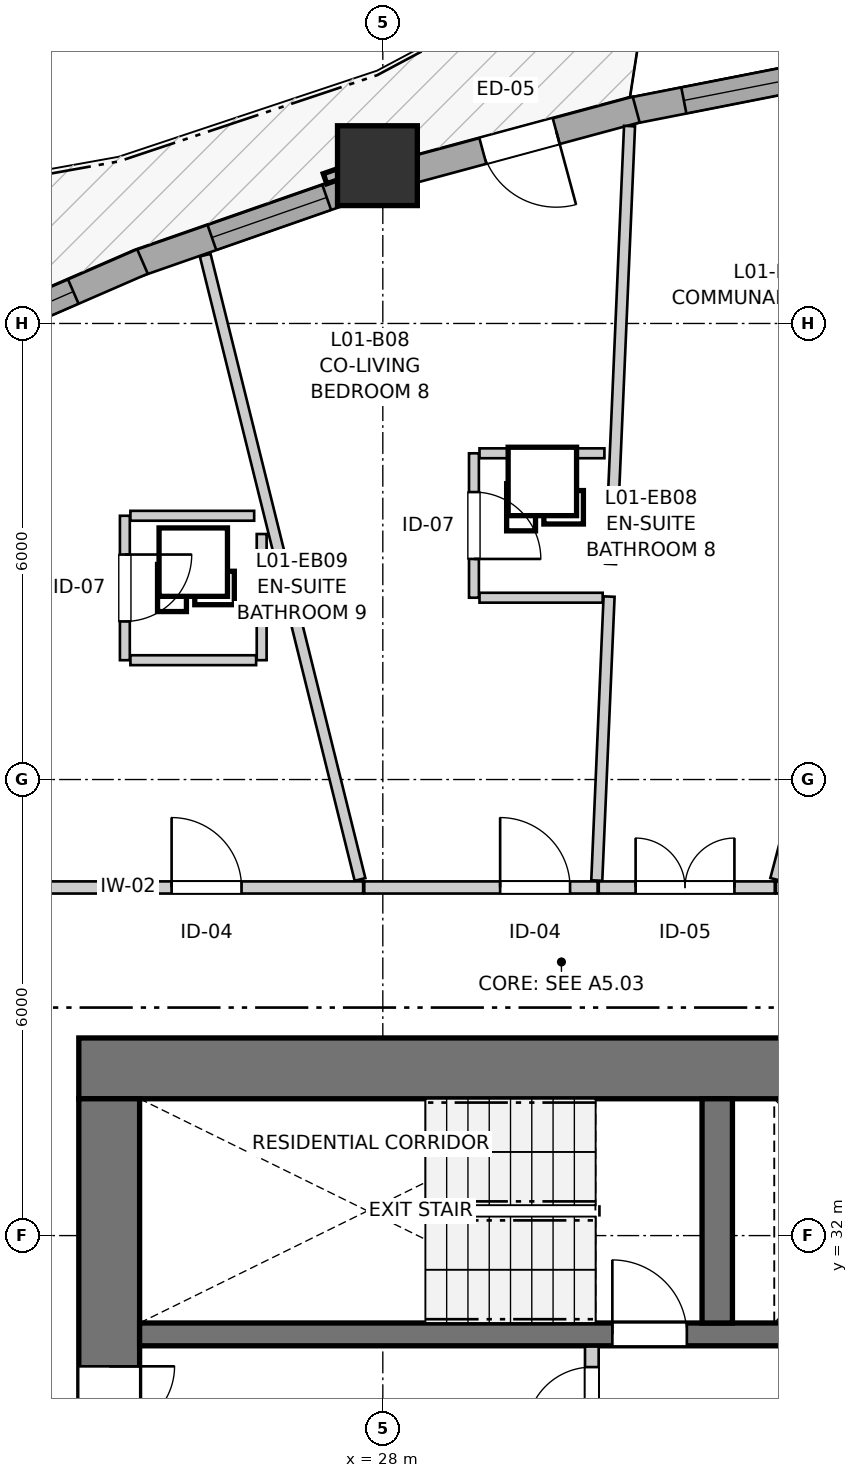
"""IFC4 building model, lengths in metres.
Left out: names, types, materials, properties, quantities, classifications, styles, units other than length and angle.
Written with IfcOpenShell. Run it as: python <this file> out.ifc"""

import sys

from ifc_helpers import new_model, si_unit, direction, frame, frame_2d, origin, origin_2d, place, context, subcontext, project, spatial, rectangle, extrude, source, transform, mapped, element, fill, save


model = new_model("IFC4")
c1 = context("Model", 3, precision=1e-05, world=origin(), true_north=direction((0.0, 1.0)))
c2 = subcontext(c1, "Body", "Model", "MODEL_VIEW")
j1 = project(units=[si_unit("LENGTHUNIT", "METRE"), si_unit("PLANEANGLEUNIT", "RADIAN")], contexts=[c1])
p1 = place(None, origin())
s1 = spatial("IfcSite", under=j1, at=p1, CompositionType="ELEMENT")
p2 = place(p1, origin())
s2 = spatial("IfcBuilding", under=s1, at=p2, CompositionType="ELEMENT")
p3 = place(p2, frame((0.0, 0.0, 7.8)))
s3 = spatial("IfcBuildingStorey", under=s2, at=p3, CompositionType="ELEMENT", Elevation=7.8)
p4 = place(p3, frame((36.7, 34.2, 0.0), z_axis=(0.0, 0.0, 1.0), x_axis=(-1.0, 0.0, 0.0)))
e1 = element("IfcWall", 1, at=p4, inside=s3, PredefinedType="SHEAR", context=c2, shape_type="SweptSolid", body=[
    extrude(rectangle(XDim=12.7, YDim=0.8, at=frame_2d((6.35, 0.0))), origin(), (0.0, 0.0, 1.0), 2.94),
])
p5 = place(p3, frame((24.4, 33.8, 0.0), z_axis=(0.0, 0.0, 1.0), x_axis=(0.0, -1.0, 0.0)))
e2 = element("IfcWall", 2, at=p5, inside=s3, PredefinedType="SHEAR", context=c2, shape_type="SweptSolid", body=[
    extrude(rectangle(XDim=15.6, YDim=0.8, at=frame_2d((7.8, 0.0))), origin(), (0.0, 0.0, 1.0), 2.94),
])
p6 = place(p5, frame((7.05, 0.0, 0.0)))
e3 = element("IfcOpeningElement", 3, at=p6, cuts=e2, PredefinedType="OPENING", context=c2, shape_type="SweptSolid", body=[
    extrude(rectangle(XDim=1.5, YDim=2.15, at=frame_2d((0.75, 1.075))), frame((0.0, 0.41, 0.0), z_axis=(0.0, -1.0, 0.0), x_axis=(1.0, 0.0, 0.0)), (0.0, 0.0, 1.0), 0.82),
])
p7 = place(p5, frame((3.52, 0.0, 0.0)))
e4 = element("IfcOpeningElement", 4, at=p7, cuts=e2, PredefinedType="OPENING", context=c2, shape_type="SweptSolid", body=[
    extrude(rectangle(XDim=0.86, YDim=2.05, at=frame_2d((0.43, 1.025))), frame((0.0, 0.41, 0.0), z_axis=(0.0, -1.0, 0.0), x_axis=(1.0, 0.0, 0.0)), (0.0, 0.0, 1.0), 0.82),
])
p8 = place(p5, frame((11.22, 0.0, 0.0)))
e5 = element("IfcOpeningElement", 5, at=p8, cuts=e2, PredefinedType="OPENING", context=c2, shape_type="SweptSolid", body=[
    extrude(rectangle(XDim=0.86, YDim=2.05, at=frame_2d((0.43, 1.025))), frame((0.0, 0.41, 0.0), z_axis=(0.0, -1.0, 0.0), x_axis=(1.0, 0.0, 0.0)), (0.0, 0.0, 1.0), 0.82),
])
p9 = place(p3, frame((24.8, 30.7, 0.0), z_axis=(0.0, 0.0, 1.0), x_axis=(1.0, 0.0, 0.0)))
e6 = element("IfcWall", 6, at=p9, inside=s3, PredefinedType="SHEAR", context=c2, shape_type="SweptSolid", body=[
    extrude(rectangle(XDim=11.1, YDim=0.3, at=frame_2d((5.55, 0.0))), origin(), (0.0, 0.0, 1.0), 2.94),
])
p10 = place(p9, frame((6.22, 0.0, 0.0)))
e7 = element("IfcOpeningElement", 7, at=p10, cuts=e6, PredefinedType="OPENING", context=c2, shape_type="SweptSolid", body=[
    extrude(rectangle(XDim=0.98, YDim=2.15, at=frame_2d((0.49, 1.075))), frame((0.0, 0.16, 0.0), z_axis=(0.0, -1.0, 0.0), x_axis=(1.0, 0.0, 0.0)), (0.0, 0.0, 1.0), 0.32),
])
p11 = place(p9, frame((9.15, 0.0, 0.0)))
e8 = element("IfcOpeningElement", 8, at=p11, cuts=e6, PredefinedType="OPENING", context=c2, shape_type="SweptSolid", body=[
    extrude(rectangle(XDim=1.15, YDim=2.15, at=frame_2d((0.575, 1.075))), frame((0.0, 0.16, 0.0), z_axis=(0.0, -1.0, 0.0), x_axis=(1.0, 0.0, 0.0)), (0.0, 0.0, 1.0), 0.32),
])
p12 = place(p3, frame((32.4, 30.85, 0.0), z_axis=(0.0, 0.0, 1.0), x_axis=(0.0, 1.0, 0.0)))
e9 = element("IfcWall", 9, at=p12, inside=s3, PredefinedType="SHEAR", context=c2, shape_type="SweptSolid", body=[
    extrude(rectangle(XDim=2.95, YDim=0.4, at=frame_2d((1.475, 0.0))), origin(), (0.0, 0.0, 1.0), 2.94),
])
m1 = source(origin(), c2, "Body", "SweptSolid", [
    extrude(rectangle(XDim=1.05, YDim=1.05, at=origin_2d()), origin(), (0.0, 0.0, 1.0), 2.94),
])
p13 = place(p3, frame((27.929, 46.076, 0.0), z_axis=(0.0, 0.0, 1.0), x_axis=(1.0, 0.0, 0.0)))
e10 = element("IfcColumn", 10, at=p13, inside=s3, PredefinedType="COLUMN", context=c2, shape_type="MappedRepresentation", body=[
    mapped(m1, transform((0.0, 0.0, 0.0), x_axis=(1.0, 0.0, 0.0), y_axis=(0.0, 1.0, 0.0), z_axis=(0.0, 0.0, 1.0), scale=1.0)),
])
p14 = place(p3, frame((34.714, 47.475, 0.0), z_axis=(0.0, 0.0, 1.0), x_axis=(-0.981221268425, -0.192885516282, 0.0)))
e11 = element("IfcWall", 11, at=p14, inside=s3, PredefinedType="SOLIDWALL", context=c2, shape_type="SweptSolid", body=[
    extrude(rectangle(XDim=3.533, YDim=0.35, at=frame_2d((1.766, 0.0))), origin(), (0.0, 0.0, 1.0), 2.42),
])
p15 = place(p14, frame((0.706, 0.0, 0.82)))
e12 = element("IfcOpeningElement", 12, at=p15, cuts=e11, PredefinedType="OPENING", context=c2, shape_type="SweptSolid", body=[
    extrude(rectangle(XDim=2.1, YDim=1.4, at=frame_2d((1.05, 0.7))), frame((0.0, 0.185, 0.0), z_axis=(0.0, -1.0, 0.0), x_axis=(1.0, 0.0, 0.0)), (0.0, 0.0, 1.0), 0.37),
])
p16 = place(p3, frame((31.333, 46.814, 0.0), z_axis=(0.0, 0.0, 1.0), x_axis=(-0.965456905924, -0.260562780926, 0.0)))
e13 = element("IfcWall", 13, at=p16, inside=s3, PredefinedType="SOLIDWALL", context=c2, shape_type="SweptSolid", body=[
    extrude(rectangle(XDim=3.179, YDim=0.35, at=frame_2d((1.59, 0.0))), origin(), (0.0, 0.0, 1.0), 2.42),
])
p17 = place(p16, frame((1.09, 0.0, 0.0)))
e14 = element("IfcOpeningElement", 14, at=p17, cuts=e13, PredefinedType="OPENING", context=c2, shape_type="SweptSolid", body=[
    extrude(rectangle(XDim=1.0, YDim=2.1, at=frame_2d((0.5, 1.05))), frame((0.0, 0.185, 0.0), z_axis=(0.0, -1.0, 0.0), x_axis=(1.0, 0.0, 0.0)), (0.0, 0.0, 1.0), 0.37),
])
p18 = place(p3, frame((27.703, 45.812, 0.0), z_axis=(0.0, 0.0, 1.0), x_axis=(-0.944149283204, -0.329518028377, 0.0)))
e15 = element("IfcWall", 15, at=p18, inside=s3, PredefinedType="SOLIDWALL", context=c2, shape_type="SweptSolid", body=[
    extrude(rectangle(XDim=3.123, YDim=0.35, at=frame_2d((1.562, 0.0))), origin(), (0.0, 0.0, 1.0), 2.42),
])
p19 = place(p18, frame((0.468, 0.0, 0.82)))
e16 = element("IfcOpeningElement", 16, at=p19, cuts=e15, PredefinedType="OPENING", context=c2, shape_type="SweptSolid", body=[
    extrude(rectangle(XDim=1.6, YDim=1.35, at=frame_2d((0.8, 0.675))), frame((0.0, 0.185, 0.0), z_axis=(0.0, -1.0, 0.0), x_axis=(1.0, 0.0, 0.0)), (0.0, 0.0, 1.0), 0.37),
])
p20 = place(p3, frame((24.838, 44.815, 0.0), z_axis=(0.0, 0.0, 1.0), x_axis=(-0.917087357706, -0.398686315712, 0.0)))
e17 = element("IfcWall", 17, at=p20, inside=s3, PredefinedType="SOLIDWALL", context=c2, shape_type="SweptSolid", body=[
    extrude(rectangle(XDim=3.365, YDim=0.35, at=frame_2d((1.683, 0.0))), origin(), (0.0, 0.0, 1.0), 2.42),
])
p21 = place(p20, frame((0.992, 0.0, 0.82)))
e18 = element("IfcOpeningElement", 18, at=p21, cuts=e17, PredefinedType="OPENING", context=c2, shape_type="SweptSolid", body=[
    extrude(rectangle(XDim=1.4, YDim=1.35, at=frame_2d((0.7, 0.675))), frame((0.0, 0.185, 0.0), z_axis=(0.0, -1.0, 0.0), x_axis=(1.0, 0.0, 0.0)), (0.0, 0.0, 1.0), 0.37),
])
p22 = place(p3, frame((30.75, 27.43, 0.0), z_axis=(0.0, 0.0, 1.0), x_axis=(0.0, 1.0, 0.0)))
e19 = element("IfcWall", 19, at=p22, inside=s3, PredefinedType="PARTITIONING", context=c2, shape_type="SweptSolid", body=[
    extrude(rectangle(XDim=3.11, YDim=0.18, at=frame_2d((1.555, 0.0))), origin(), (0.0, 0.0, 1.0), 2.94),
])
p23 = place(p22, frame((1.98, 0.0, 0.0)))
e20 = element("IfcOpeningElement", 20, at=p23, cuts=e19, PredefinedType="OPENING", context=c2, shape_type="SweptSolid", body=[
    extrude(rectangle(XDim=0.86, YDim=2.05, at=frame_2d((0.43, 1.025))), frame((0.0, 0.1, 0.0), z_axis=(0.0, -1.0, 0.0), x_axis=(1.0, 0.0, 0.0)), (0.0, 0.0, 1.0), 0.2),
])
p24 = place(p3, frame((23.618, 36.58, 0.0), z_axis=(0.0, 0.0, 1.0), x_axis=(1.0, 0.0, 0.0)))
e21 = element("IfcWall", 21, at=p24, inside=s3, PredefinedType="PARTITIONING", context=c2, shape_type="SweptSolid", body=[
    extrude(rectangle(XDim=4.123, YDim=0.16, at=frame_2d((2.062, 0.0))), origin(), (0.0, 0.0, 1.0), 2.548),
])
p25 = place(p24, frame((1.603, 0.0, 0.0)))
e22 = element("IfcOpeningElement", 22, at=p25, cuts=e21, PredefinedType="OPENING", context=c2, shape_type="SweptSolid", body=[
    extrude(rectangle(XDim=0.92, YDim=2.1, at=frame_2d((0.46, 1.05))), frame((0.0, 0.09, 0.0), z_axis=(0.0, -1.0, 0.0), x_axis=(1.0, 0.0, 0.0)), (0.0, 0.0, 1.0), 0.18),
])
p26 = place(p3, frame((27.756, 36.58, 0.0), z_axis=(0.0, 0.0, 1.0), x_axis=(1.0, 0.0, 0.0)))
e23 = element("IfcWall", 23, at=p26, inside=s3, PredefinedType="PARTITIONING", context=c2, shape_type="SweptSolid", body=[
    extrude(rectangle(XDim=3.07, YDim=0.16, at=frame_2d((1.535, 0.0))), origin(), (0.0, 0.0, 1.0), 2.94),
])
p27 = place(p26, frame((1.788, 0.0, 0.0)))
e24 = element("IfcOpeningElement", 24, at=p27, cuts=e23, PredefinedType="OPENING", context=c2, shape_type="SweptSolid", body=[
    extrude(rectangle(XDim=0.92, YDim=2.1, at=frame_2d((0.46, 1.05))), frame((0.0, 0.09, 0.0), z_axis=(0.0, -1.0, 0.0), x_axis=(1.0, 0.0, 0.0)), (0.0, 0.0, 1.0), 0.18),
])
p28 = place(p3, frame((30.841, 36.58, 0.0), z_axis=(0.0, 0.0, 1.0), x_axis=(1.0, 0.0, 0.0)))
e25 = element("IfcWall", 25, at=p28, inside=s3, PredefinedType="PARTITIONING", context=c2, shape_type="SweptSolid", body=[
    extrude(rectangle(XDim=2.316, YDim=0.16, at=frame_2d((1.158, 0.0))), origin(), (0.0, 0.0, 1.0), 2.94),
])
p29 = place(p28, frame((0.485, 0.0, 0.0)))
e26 = element("IfcOpeningElement", 26, at=p29, cuts=e25, PredefinedType="OPENING", context=c2, shape_type="SweptSolid", body=[
    extrude(rectangle(XDim=1.3, YDim=2.1, at=frame_2d((0.65, 1.05))), frame((0.0, 0.09, 0.0), z_axis=(0.0, -1.0, 0.0), x_axis=(1.0, 0.0, 0.0)), (0.0, 0.0, 1.0), 0.18),
])
p30 = place(p3, frame((33.172, 36.58, 0.0), z_axis=(0.0, 0.0, 1.0), x_axis=(1.0, 0.0, 0.0)))
e27 = element("IfcWall", 27, at=p30, inside=s3, PredefinedType="PARTITIONING", context=c2, shape_type="SweptSolid", body=[
    extrude(rectangle(XDim=2.173, YDim=0.16, at=frame_2d((1.086, 0.0))), origin(), (0.0, 0.0, 1.0), 2.94),
])
p31 = place(p30, frame((0.603, 0.0, 0.0)))
e28 = element("IfcOpeningElement", 28, at=p31, cuts=e27, PredefinedType="OPENING", context=c2, shape_type="SweptSolid", body=[
    extrude(rectangle(XDim=0.92, YDim=2.1, at=frame_2d((0.46, 1.05))), frame((0.0, 0.09, 0.0), z_axis=(0.0, -1.0, 0.0), x_axis=(1.0, 0.0, 0.0)), (0.0, 0.0, 1.0), 0.18),
])
p32 = place(p3, frame((29.199, 42.292, 0.0), z_axis=(0.0, 0.0, 1.0), x_axis=(0.0, -1.0, 0.0)))
e29 = element("IfcWall", 29, at=p32, inside=s3, PredefinedType="PARTITIONING", context=c2, shape_type="SweptSolid", body=[
    extrude(rectangle(XDim=1.9, YDim=0.13, at=frame_2d((0.95, 0.0))), origin(), (0.0, 0.0, 1.0), 2.94),
])
p33 = place(p32, frame((0.51, 0.0, 0.0)))
e30 = element("IfcOpeningElement", 30, at=p33, cuts=e29, PredefinedType="OPENING", context=c2, shape_type="SweptSolid", body=[
    extrude(rectangle(XDim=0.88, YDim=2.05, at=frame_2d((0.44, 1.025))), frame((0.0, 0.075, 0.0), z_axis=(0.0, -1.0, 0.0), x_axis=(1.0, 0.0, 0.0)), (0.0, 0.0, 1.0), 0.15),
])
p34 = place(p3, frame((24.606, 41.47, 0.0), z_axis=(0.0, 0.0, 1.0), x_axis=(0.0, -1.0, 0.0)))
e31 = element("IfcWall", 31, at=p34, inside=s3, PredefinedType="PARTITIONING", context=c2, shape_type="SweptSolid", body=[
    extrude(rectangle(XDim=1.9, YDim=0.13, at=frame_2d((0.95, 0.0))), origin(), (0.0, 0.0, 1.0), 2.94),
])
p35 = place(p34, frame((0.51, 0.0, 0.0)))
e32 = element("IfcOpeningElement", 32, at=p35, cuts=e31, PredefinedType="OPENING", context=c2, shape_type="SweptSolid", body=[
    extrude(rectangle(XDim=0.88, YDim=2.05, at=frame_2d((0.44, 1.025))), frame((0.0, 0.075, 0.0), z_axis=(0.0, -1.0, 0.0), x_axis=(1.0, 0.0, 0.0)), (0.0, 0.0, 1.0), 0.15),
])
p36 = place(p3, frame((33.169, 36.686, 0.0), z_axis=(0.0, 0.0, 1.0), x_axis=(0.255112522394, 0.966911371801, 0.0)))
e33 = element("IfcWall", 33, at=p36, inside=s3, PredefinedType="PARTITIONING", context=c2, shape_type="SweptSolid", body=[
    extrude(rectangle(XDim=11.469, YDim=0.145, at=frame_2d((5.734, 0.0))), origin(), (0.0, 0.0, 1.0), 2.94),
])
p37 = place(p3, frame((25.663, 44.899, 0.0), z_axis=(0.0, 0.0, 1.0), x_axis=(0.240695577024, -0.970600658974, 0.0)))
e34 = element("IfcWall", 34, at=p37, inside=s3, PredefinedType="PARTITIONING", context=c2, shape_type="SweptSolid", body=[
    extrude(rectangle(XDim=8.462, YDim=0.145, at=frame_2d((4.231, 0.0))), origin(), (0.0, 0.0, 1.0), 2.94),
])
p38 = place(p3, frame((30.996, 40.836, 0.0), z_axis=(0.0, 0.0, 1.0), x_axis=(0.043354544378, 0.999059749706, 0.0)))
e35 = element("IfcWall", 35, at=p38, inside=s3, PredefinedType="PARTITIONING", context=c2, shape_type="SweptSolid", body=[
    extrude(rectangle(XDim=5.766, YDim=0.145, at=frame_2d((2.883, 0.0))), origin(), (0.0, 0.0, 1.0), 2.94),
])
p39 = place(p3, frame((30.815, 36.671, 0.0), z_axis=(0.0, 0.0, 1.0), x_axis=(0.043352224588, 0.999059850371, 0.0)))
e36 = element("IfcWall", 36, at=p39, inside=s3, PredefinedType="PARTITIONING", context=c2, shape_type="SweptSolid", body=[
    extrude(rectangle(XDim=3.739, YDim=0.145, at=frame_2d((1.87, 0.0))), origin(), (0.0, 0.0, 1.0), 2.94),
])
p40 = place(p3, frame((26.406, 39.57, 0.0), z_axis=(0.0, 0.0, 1.0), x_axis=(0.0, 1.0, 0.0)))
e37 = element("IfcWall", 37, at=p40, inside=s3, PredefinedType="PARTITIONING", context=c2, shape_type="SweptSolid", body=[
    extrude(rectangle(XDim=1.66, YDim=0.13, at=frame_2d((0.83, 0.0))), origin(), (0.0, 0.0, 1.0), 2.94),
])
p41 = place(p3, frame((29.272, 42.292, 0.0), z_axis=(0.0, 0.0, 1.0), x_axis=(1.0, 0.0, 0.0)))
e38 = element("IfcWall", 38, at=p41, inside=s3, PredefinedType="PARTITIONING", context=c2, shape_type="SweptSolid", body=[
    extrude(rectangle(XDim=1.644, YDim=0.13, at=frame_2d((0.822, 0.0))), origin(), (0.0, 0.0, 1.0), 2.508),
])
p42 = place(p3, frame((24.679, 41.47, 0.0), z_axis=(0.0, 0.0, 1.0), x_axis=(1.0, 0.0, 0.0)))
e39 = element("IfcWall", 39, at=p42, inside=s3, PredefinedType="PARTITIONING", context=c2, shape_type="SweptSolid", body=[
    extrude(rectangle(XDim=1.628, YDim=0.13, at=frame_2d((0.814, 0.0))), origin(), (0.0, 0.0, 1.0), 2.508),
])
p43 = place(p3, frame((24.679, 39.57, 0.0), z_axis=(0.0, 0.0, 1.0), x_axis=(1.0, 0.0, 0.0)))
e40 = element("IfcWall", 40, at=p43, inside=s3, PredefinedType="PARTITIONING", context=c2, shape_type="SweptSolid", body=[
    extrude(rectangle(XDim=1.654, YDim=0.13, at=frame_2d((0.827, 0.0))), origin(), (0.0, 0.0, 1.0), 2.94),
])
p44 = place(p3, frame((29.272, 40.392, 0.0), z_axis=(0.0, 0.0, 1.0), x_axis=(1.0, 0.0, 0.0)))
e41 = element("IfcWall", 41, at=p44, inside=s3, PredefinedType="PARTITIONING", context=c2, shape_type="SweptSolid", body=[
    extrude(rectangle(XDim=1.621, YDim=0.13, at=frame_2d((0.81, 0.0))), origin(), (0.0, 0.0, 1.0), 2.94),
])
m2 = source(origin(), c2, "Body", "SweptSolid", [
    extrude(rectangle(XDim=2.1, YDim=1.4, at=frame_2d((1.05, 0.7))), frame((0.0, 0.03, 0.0), z_axis=(0.0, -1.0, 0.0), x_axis=(1.0, 0.0, 0.0)), (0.0, 0.0, 1.0), 0.06),
])
p45 = place(p15, origin())
e42 = element("IfcWindow", 42, at=p45, inside=s3, PartitioningType="SINGLE_PANEL", PredefinedType="WINDOW", context=c2, shape_type="MappedRepresentation", body=[
    mapped(m2, transform((0.0, 0.0, 0.0), x_axis=(1.0, 0.0, 0.0), y_axis=(0.0, 1.0, 0.0), z_axis=(0.0, 0.0, 1.0), scale=1.0)),
])
fill(e12, e42)
m3 = source(origin(), c2, "Body", "SweptSolid", [
    extrude(rectangle(XDim=1.6, YDim=1.35, at=frame_2d((0.8, 0.675))), frame((0.0, 0.03, 0.0), z_axis=(0.0, -1.0, 0.0), x_axis=(1.0, 0.0, 0.0)), (0.0, 0.0, 1.0), 0.06),
])
p46 = place(p19, origin())
e43 = element("IfcWindow", 43, at=p46, inside=s3, PartitioningType="SINGLE_PANEL", PredefinedType="WINDOW", context=c2, shape_type="MappedRepresentation", body=[
    mapped(m3, transform((0.0, 0.0, 0.0), x_axis=(1.0, 0.0, 0.0), y_axis=(0.0, 1.0, 0.0), z_axis=(0.0, 0.0, 1.0), scale=1.0)),
])
fill(e16, e43)
m4 = source(origin(), c2, "Body", "SweptSolid", [
    extrude(rectangle(XDim=1.4, YDim=1.35, at=frame_2d((0.7, 0.675))), frame((0.0, 0.03, 0.0), z_axis=(0.0, -1.0, 0.0), x_axis=(1.0, 0.0, 0.0)), (0.0, 0.0, 1.0), 0.06),
])
p47 = place(p21, origin())
e44 = element("IfcWindow", 44, at=p47, inside=s3, PartitioningType="SINGLE_PANEL", PredefinedType="WINDOW", context=c2, shape_type="MappedRepresentation", body=[
    mapped(m4, transform((0.0, 0.0, 0.0), x_axis=(1.0, 0.0, 0.0), y_axis=(0.0, 1.0, 0.0), z_axis=(0.0, 0.0, 1.0), scale=1.0)),
])
fill(e18, e44)
m5 = source(origin(), c2, "Body", "SweptSolid", [
    extrude(rectangle(XDim=1.0, YDim=2.1, at=frame_2d((0.5, 1.05))), frame((0.0, 0.025, 0.0), z_axis=(0.0, -1.0, 0.0), x_axis=(1.0, 0.0, 0.0)), (0.0, 0.0, 1.0), 0.05),
])
p48 = place(p17, origin())
e45 = element("IfcDoor", 45, at=p48, inside=s3, OperationType="SINGLE_SWING_LEFT", PredefinedType="DOOR", context=c2, shape_type="MappedRepresentation", body=[
    mapped(m5, transform((0.0, 0.0, 0.0), x_axis=(1.0, 0.0, 0.0), y_axis=(0.0, 1.0, 0.0), z_axis=(0.0, 0.0, 1.0), scale=1.0)),
])
fill(e14, e45)
m6 = source(origin(), c2, "Body", "SweptSolid", [
    extrude(rectangle(XDim=0.98, YDim=2.15, at=frame_2d((0.49, 1.075))), frame((0.0, 0.025, 0.0), z_axis=(0.0, -1.0, 0.0), x_axis=(1.0, 0.0, 0.0)), (0.0, 0.0, 1.0), 0.05),
])
p49 = place(p10, origin())
e46 = element("IfcDoor", 46, at=p49, inside=s3, OperationType="SINGLE_SWING_LEFT", PredefinedType="DOOR", context=c2, shape_type="MappedRepresentation", body=[
    mapped(m6, transform((0.0, 0.0, 0.0), x_axis=(1.0, 0.0, 0.0), y_axis=(0.0, 1.0, 0.0), z_axis=(0.0, 0.0, 1.0), scale=1.0)),
])
fill(e7, e46)
m7 = source(origin(), c2, "Body", "SweptSolid", [
    extrude(rectangle(XDim=0.86, YDim=2.05, at=frame_2d((0.43, 1.025))), frame((0.0, 0.025, 0.0), z_axis=(0.0, -1.0, 0.0), x_axis=(1.0, 0.0, 0.0)), (0.0, 0.0, 1.0), 0.05),
])
p50 = place(p7, origin())
e47 = element("IfcDoor", 47, at=p50, inside=s3, OperationType="SINGLE_SWING_LEFT", PredefinedType="DOOR", context=c2, shape_type="MappedRepresentation", body=[
    mapped(m7, transform((0.0, 0.0, 0.0), x_axis=(1.0, 0.0, 0.0), y_axis=(0.0, 1.0, 0.0), z_axis=(0.0, 0.0, 1.0), scale=1.0)),
])
fill(e4, e47)
p51 = place(p23, origin())
e48 = element("IfcDoor", 48, at=p51, inside=s3, OperationType="SINGLE_SWING_LEFT", PredefinedType="DOOR", context=c2, shape_type="MappedRepresentation", body=[
    mapped(m7, transform((0.0, 0.0, 0.0), x_axis=(1.0, 0.0, 0.0), y_axis=(0.0, 1.0, 0.0), z_axis=(0.0, 0.0, 1.0), scale=1.0)),
])
fill(e20, e48)
m8 = source(origin(), c2, "Body", "SweptSolid", [
    extrude(rectangle(XDim=0.92, YDim=2.1, at=frame_2d((0.46, 1.05))), frame((0.0, 0.025, 0.0), z_axis=(0.0, -1.0, 0.0), x_axis=(1.0, 0.0, 0.0)), (0.0, 0.0, 1.0), 0.05),
])
p52 = place(p25, origin())
e49 = element("IfcDoor", 49, at=p52, inside=s3, OperationType="SINGLE_SWING_LEFT", PredefinedType="DOOR", context=c2, shape_type="MappedRepresentation", body=[
    mapped(m8, transform((0.0, 0.0, 0.0), x_axis=(1.0, 0.0, 0.0), y_axis=(0.0, 1.0, 0.0), z_axis=(0.0, 0.0, 1.0), scale=1.0)),
])
fill(e22, e49)
p53 = place(p27, origin())
e50 = element("IfcDoor", 50, at=p53, inside=s3, OperationType="SINGLE_SWING_LEFT", PredefinedType="DOOR", context=c2, shape_type="MappedRepresentation", body=[
    mapped(m8, transform((0.0, 0.0, 0.0), x_axis=(1.0, 0.0, 0.0), y_axis=(0.0, 1.0, 0.0), z_axis=(0.0, 0.0, 1.0), scale=1.0)),
])
fill(e24, e50)
m9 = source(origin(), c2, "Body", "SweptSolid", [
    extrude(rectangle(XDim=1.3, YDim=2.1, at=frame_2d((0.65, 1.05))), frame((0.0, 0.025, 0.0), z_axis=(0.0, -1.0, 0.0), x_axis=(1.0, 0.0, 0.0)), (0.0, 0.0, 1.0), 0.05),
])
p54 = place(p29, origin())
e51 = element("IfcDoor", 51, at=p54, inside=s3, OperationType="DOUBLE_DOOR_SINGLE_SWING", PredefinedType="DOOR", context=c2, shape_type="MappedRepresentation", body=[
    mapped(m9, transform((0.0, 0.0, 0.0), x_axis=(1.0, 0.0, 0.0), y_axis=(0.0, 1.0, 0.0), z_axis=(0.0, 0.0, 1.0), scale=1.0)),
])
fill(e26, e51)
m10 = source(origin(), c2, "Body", "SweptSolid", [
    extrude(rectangle(XDim=0.88, YDim=2.05, at=frame_2d((0.44, 1.025))), frame((0.0, 0.025, 0.0), z_axis=(0.0, -1.0, 0.0), x_axis=(1.0, 0.0, 0.0)), (0.0, 0.0, 1.0), 0.05),
])
p55 = place(p33, origin())
e52 = element("IfcDoor", 52, at=p55, inside=s3, OperationType="SINGLE_SWING_RIGHT", PredefinedType="DOOR", context=c2, shape_type="MappedRepresentation", body=[
    mapped(m10, transform((0.0, 0.0, 0.0), x_axis=(1.0, 0.0, 0.0), y_axis=(0.0, 1.0, 0.0), z_axis=(0.0, 0.0, 1.0), scale=1.0)),
])
fill(e30, e52)
p56 = place(p35, origin())
e53 = element("IfcDoor", 53, at=p56, inside=s3, OperationType="SINGLE_SWING_LEFT", PredefinedType="DOOR", context=c2, shape_type="MappedRepresentation", body=[
    mapped(m10, transform((0.0, 0.0, 0.0), x_axis=(1.0, 0.0, 0.0), y_axis=(0.0, 1.0, 0.0), z_axis=(0.0, 0.0, 1.0), scale=1.0)),
])
fill(e32, e53)
save(model, sys.argv[1])
